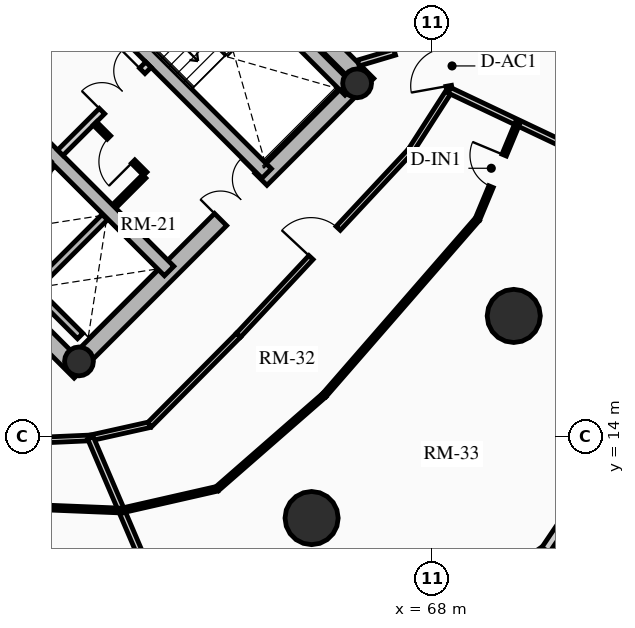
"""IFC4 building model, lengths in metres.
Left out: names, types, materials, properties, quantities, classifications, styles, units other than length and angle.
Written with IfcOpenShell. Run it as: python <this file> out.ifc"""

import sys

from ifc_helpers import new_model, si_unit, direction, frame, frame_2d, origin, origin_2d, place, context, subcontext, project, spatial, rectangle, circle, hollow_circle, extrude, source, transform, mapped, element, fill, save


model = new_model("IFC4")
c1 = context("Model", 3, precision=1e-05, world=origin(), true_north=direction((0.0, 1.0)))
c2 = subcontext(c1, "Body", "Model", "MODEL_VIEW")
j1 = project(units=[si_unit("LENGTHUNIT", "METRE"), si_unit("PLANEANGLEUNIT", "RADIAN")], contexts=[c1])
p1 = place(None, origin())
s1 = spatial("IfcSite", under=j1, at=p1, CompositionType="ELEMENT")
p2 = place(p1, origin())
s2 = spatial("IfcBuilding", under=s1, at=p2, CompositionType="ELEMENT")
p3 = place(p2, frame((0.0, 0.0, 107.98)))
s3 = spatial("IfcBuildingStorey", under=s2, at=p3, CompositionType="ELEMENT", Elevation=107.98)
for number, where, z_axis, x_axis in (
    (1, (58.737, 15.697, 0.0), (0.0, 0.0, 1.0), (-0.707, 0.707, 0.0)),
    (2, (66.303, 23.263, 0.0), (0.0, 0.0, 1.0), (-0.707, 0.707, 0.0)),
):
    element("IfcWall", number, at=place(p3, frame(where, z_axis=z_axis, x_axis=x_axis)), inside=s3, PredefinedType="SHEAR", context=c2, shape_type="SweptSolid", body=[
        extrude(rectangle(XDim=14.2, YDim=0.45, at=frame_2d((7.1, 0.0))), origin(), (0.0, 0.0, 1.0), 2.91),
    ])
p4 = place(p3, frame((58.578, 15.856, 0.0), z_axis=(0.0, 0.0, 1.0), x_axis=(0.707106781187, 0.707106781187, 0.0)))
e3 = element("IfcWall", 3, at=p4, inside=s3, PredefinedType="SHEAR", context=c2, shape_type="SweptSolid", body=[
    extrude(rectangle(XDim=10.7, YDim=0.45, at=frame_2d((5.35, 0.0))), origin(), (0.0, 0.0, 1.0), 2.91),
])
m1 = source(origin(), c2, "Body", "SweptSolid", [
    extrude(rectangle(XDim=1.5, YDim=2.02, at=frame_2d((0.75, 1.01))), frame((0.0, 0.235, 0.0), z_axis=(0.0, -1.0, 0.0), x_axis=(1.0, 0.0, 0.0)), (0.0, 0.0, 1.0), 0.47),
])
p5 = place(p4, frame((5.45, 0.0, 0.0)))
e4 = element("IfcOpeningElement", 4, at=p5, cuts=e3, PredefinedType="OPENING", context=c2, shape_type="MappedRepresentation", body=[
    mapped(m1, transform((0.0, 0.0, 0.0), x_axis=(1.0, 0.0, 0.0), y_axis=(0.0, 1.0, 0.0), z_axis=(0.0, 0.0, 1.0), scale=1.0)),
])
p6 = place(p3, frame((61.078, 18.355, 0.0), z_axis=(0.0, 0.0, 1.0), x_axis=(-0.707106781187, 0.707106781187, 0.0)))
e5 = element("IfcWall", 5, at=p6, inside=s3, PredefinedType="SHEAR", context=c2, shape_type="SweptSolid", body=[
    extrude(rectangle(XDim=13.75, YDim=0.35, at=frame_2d((6.875, 0.0))), origin(), (0.0, 0.0, 1.0), 2.91),
])
m2 = source(origin(), c2, "Body", "SweptSolid", [
    extrude(rectangle(XDim=1.1, YDim=2.015, at=frame_2d((0.55, 1.007))), frame((0.0, 0.185, 0.0), z_axis=(0.0, -1.0, 0.0), x_axis=(1.0, 0.0, 0.0)), (0.0, 0.0, 1.0), 0.37),
])
p7 = place(p6, frame((4.875, 0.0, 0.0)))
e6 = element("IfcOpeningElement", 6, at=p7, cuts=e5, PredefinedType="OPENING", context=c2, shape_type="MappedRepresentation", body=[
    mapped(m2, transform((0.0, 0.0, 0.0), x_axis=(1.0, 0.0, 0.0), y_axis=(0.0, 1.0, 0.0), z_axis=(0.0, 0.0, 1.0), scale=1.0)),
])
m3 = source(origin(), c2, "Body", "SweptSolid", [
    extrude(rectangle(XDim=1.15, YDim=2.02, at=frame_2d((0.575, 1.01))), frame((0.0, 0.185, 0.0), z_axis=(0.0, -1.0, 0.0), x_axis=(1.0, 0.0, 0.0)), (0.0, 0.0, 1.0), 0.37),
])
p8 = place(p6, frame((7.295, 0.0, 0.0)))
e7 = element("IfcOpeningElement", 7, at=p8, cuts=e5, PredefinedType="OPENING", context=c2, shape_type="MappedRepresentation", body=[
    mapped(m3, transform((0.0, 0.0, 0.0), x_axis=(1.0, 0.0, 0.0), y_axis=(0.0, 1.0, 0.0), z_axis=(0.0, 0.0, 1.0), scale=1.0)),
])
p9 = place(p3, frame((63.645, 20.922, 0.0), z_axis=(0.0, 0.0, 1.0), x_axis=(-0.707106781187, 0.707106781187, 0.0)))
e8 = element("IfcWall", 8, at=p9, inside=s3, PredefinedType="SHEAR", context=c2, shape_type="SweptSolid", body=[
    extrude(rectangle(XDim=13.75, YDim=0.35, at=frame_2d((6.875, 0.0))), origin(), (0.0, 0.0, 1.0), 2.91),
])
p10 = place(p9, frame((10.0, 0.0, 0.0)))
e9 = element("IfcOpeningElement", 9, at=p10, cuts=e8, PredefinedType="OPENING", context=c2, shape_type="MappedRepresentation", body=[
    mapped(m2, transform((0.0, 0.0, 0.0), x_axis=(1.0, 0.0, 0.0), y_axis=(0.0, 1.0, 0.0), z_axis=(0.0, 0.0, 1.0), scale=1.0)),
])
p11 = place(p9, frame((12.0, 0.0, 0.0)))
e10 = element("IfcOpeningElement", 10, at=p11, cuts=e8, PredefinedType="OPENING", context=c2, shape_type="MappedRepresentation", body=[
    mapped(m2, transform((0.0, 0.0, 0.0), x_axis=(1.0, 0.0, 0.0), y_axis=(0.0, 1.0, 0.0), z_axis=(0.0, 0.0, 1.0), scale=1.0)),
])
p12 = place(p9, frame((5.305, 0.0, 0.0)))
e11 = element("IfcOpeningElement", 11, at=p12, cuts=e8, PredefinedType="OPENING", context=c2, shape_type="MappedRepresentation", body=[
    mapped(m3, transform((0.0, 0.0, 0.0), x_axis=(1.0, 0.0, 0.0), y_axis=(0.0, 1.0, 0.0), z_axis=(0.0, 0.0, 1.0), scale=1.0)),
])
p13 = place(p3, frame((65.83, 23.107, 0.0), z_axis=(0.0, 0.0, 1.0), x_axis=(-0.707088616009, 0.707124945897, 0.0)))
e12 = element("IfcWall", 12, at=p13, inside=s3, PredefinedType="SHEAR", context=c2, shape_type="SweptSolid", body=[
    extrude(rectangle(XDim=6.72, YDim=0.35, at=frame_2d((3.36, 0.0))), origin(), (0.0, 0.0, 1.0), 2.91),
])
for number, where, z_axis, x_axis in (
    (13, (58.706, 15.976, 0.0), (0.0, 0.0, 1.0), (0.707, 0.707, 0.0)),
    (14, (66.024, 23.294, 0.0), (0.0, 0.0, 1.0), (0.707, 0.707, 0.0)),
):
    element("IfcColumn", number, at=place(p3, frame(where, z_axis=z_axis, x_axis=x_axis)), inside=s3, PredefinedType="COLUMN", context=c2, shape_type="SweptSolid", body=[
        extrude(hollow_circle(Radius=0.38, WallThickness=0.032, at=origin_2d()), origin(), (0.0, 0.0, 1.0), 2.91),
    ])
for number, where, z_axis, x_axis in (
    (15, (64.827, 11.854, 0.0), (0.0, 0.0, 1.0), (1.0, 0.0, 0.0)),
    (16, (70.146, 17.173, 0.0), (0.0, 0.0, 1.0), (1.0, 0.0, 0.0)),
):
    element("IfcColumn", number, at=place(p3, frame(where, z_axis=z_axis, x_axis=x_axis)), inside=s3, PredefinedType="USERDEFINED", context=c2, shape_type="SweptSolid", body=[
        extrude(circle(Radius=0.7, at=origin_2d()), origin(), (0.0, 0.0, 1.0), 2.91),
    ])
p14 = place(p3, frame((70.985, 11.015, 0.0), z_axis=(0.0, 0.0, 1.0), x_axis=(-0.828781148131, -0.559572880421, 0.0)))
e17 = element("IfcWall", 17, at=p14, inside=s3, PredefinedType="SOLIDWALL", context=c2, shape_type="SweptSolid", body=[
    extrude(rectangle(XDim=4.905, YDim=0.24, at=frame_2d((2.452, 0.0))), origin(), (0.0, 0.0, 1.0), 2.179),
])
p15 = place(p3, frame((73.729, 15.08, 0.0), z_axis=(0.0, 0.0, 1.0), x_axis=(-0.559572880421, -0.828781148131, 0.0)))
e18 = element("IfcWall", 18, at=p15, inside=s3, PredefinedType="SOLIDWALL", context=c2, shape_type="SweptSolid", body=[
    extrude(rectangle(XDim=4.905, YDim=0.24, at=frame_2d((2.452, 0.0))), origin(), (0.0, 0.0, 1.0), 2.179),
])
m4 = source(origin(), c2, "Body", "SweptSolid", [
    extrude(rectangle(XDim=1.9, YDim=1.35, at=frame_2d((0.95, 0.675))), frame((0.0, 0.13, 0.0), z_axis=(0.0, -1.0, 0.0), x_axis=(1.0, 0.0, 0.0)), (0.0, 0.0, 1.0), 0.26),
])
p16 = place(p15, frame((1.502, 0.0, 0.65)))
e19 = element("IfcOpeningElement", 19, at=p16, cuts=e18, PredefinedType="OPENING", context=c2, shape_type="MappedRepresentation", body=[
    mapped(m4, transform((0.0, 0.0, 0.0), x_axis=(1.0, 0.0, 0.0), y_axis=(0.0, 1.0, 0.0), z_axis=(0.0, 0.0, 1.0), scale=1.0)),
])
p17 = place(p3, frame((55.888, 19.069, 0.0), z_axis=(0.0, 0.0, 1.0), x_axis=(0.707106781187, 0.707106781187, 0.0)))
e20 = element("IfcWall", 20, at=p17, inside=s3, PredefinedType="SHEAR", context=c2, shape_type="SweptSolid", body=[
    extrude(rectangle(XDim=2.97, YDim=0.2, at=frame_2d((1.485, 0.0))), origin(), (0.0, 0.0, 1.0), 2.91),
])
p18 = place(p3, frame((57.284, 17.673, 0.0), z_axis=(0.0, 0.0, 1.0), x_axis=(0.707147878904, 0.70706568108, 0.0)))
e21 = element("IfcWall", 21, at=p18, inside=s3, PredefinedType="SHEAR", context=c2, shape_type="SweptSolid", body=[
    extrude(rectangle(XDim=2.97, YDim=0.2, at=frame_2d((1.485, 0.0))), origin(), (0.0, 0.0, 1.0), 2.91),
])
p19 = place(p3, frame((58.737, 16.644, 0.0), z_axis=(0.0, 0.0, 1.0), x_axis=(-0.707032117043, 0.707181437447, 0.0)))
e22 = element("IfcWall", 22, at=p19, inside=s3, PredefinedType="SHEAR", context=c2, shape_type="SweptSolid", body=[
    extrude(rectangle(XDim=1.635, YDim=0.2, at=frame_2d((0.817, 0.0))), origin(), (0.0, 0.0, 1.0), 2.91),
])
p20 = place(p3, frame((58.214, 21.467, 0.0), z_axis=(0.0, 0.0, 1.0), x_axis=(0.707106781187, 0.707106781187, 0.0)))
e23 = element("IfcWall", 23, at=p20, inside=s3, PredefinedType="PARTITIONING", context=c2, shape_type="SweptSolid", body=[
    extrude(rectangle(XDim=3.28, YDim=0.2, at=frame_2d((1.64, 0.0))), origin(), (0.0, 0.0, 1.0), 2.655),
])
m5 = source(origin(), c2, "Body", "SweptSolid", [
    extrude(rectangle(XDim=1.5, YDim=2.02, at=frame_2d((0.75, 1.01))), frame((0.0, 0.11, 0.0), z_axis=(0.0, -1.0, 0.0), x_axis=(1.0, 0.0, 0.0)), (0.0, 0.0, 1.0), 0.22),
])
p21 = place(p20, frame((1.55, 0.0, 0.0)))
e24 = element("IfcOpeningElement", 24, at=p21, cuts=e23, PredefinedType="OPENING", context=c2, shape_type="MappedRepresentation", body=[
    mapped(m5, transform((0.0, 0.0, 0.0), x_axis=(1.0, 0.0, 0.0), y_axis=(0.0, 1.0, 0.0), z_axis=(0.0, 0.0, 1.0), scale=1.0)),
])
p22 = place(p3, frame((60.448, 20.915, 0.0), z_axis=(0.0, 0.0, 1.0), x_axis=(-0.707106781187, 0.707106781187, 0.0)))
e25 = element("IfcWall", 25, at=p22, inside=s3, PredefinedType="PARTITIONING", context=c2, shape_type="SweptSolid", body=[
    extrude(rectangle(XDim=1.87, YDim=0.125, at=frame_2d((0.935, 0.0))), origin(), (0.0, 0.0, 1.0), 2.655),
])
m6 = source(origin(), c2, "Body", "SweptSolid", [
    extrude(rectangle(XDim=0.9, YDim=2.005, at=frame_2d((0.45, 1.002))), frame((0.0, 0.073, 0.0), z_axis=(0.0, -1.0, 0.0), x_axis=(1.0, 0.0, 0.0)), (0.0, 0.0, 1.0), 0.145),
])
p23 = place(p22, frame((0.45, 0.0, 0.0)))
e26 = element("IfcOpeningElement", 26, at=p23, cuts=e25, PredefinedType="OPENING", context=c2, shape_type="MappedRepresentation", body=[
    mapped(m6, transform((0.0, 0.0, 0.0), x_axis=(1.0, 0.0, 0.0), y_axis=(0.0, 1.0, 0.0), z_axis=(0.0, 0.0, 1.0), scale=1.0)),
])
p24 = place(p3, frame((59.643, 20.066, 0.0), z_axis=(0.0, 0.0, 1.0), x_axis=(0.707106781187, 0.707106781187, 0.0)))
e27 = element("IfcWall", 27, at=p24, inside=s3, PredefinedType="PARTITIONING", context=c2, shape_type="SweptSolid", body=[
    extrude(rectangle(XDim=1.1, YDim=0.125, at=frame_2d((0.55, 0.0))), origin(), (0.0, 0.0, 1.0), 2.655),
])
p25 = place(p3, frame((57.511, 13.897, 0.0), z_axis=(0.0, 0.0, 1.0), x_axis=(0.999024538494, 0.044158481476, 0.0)))
e28 = element("IfcWall", 28, at=p25, inside=s3, PredefinedType="PARTITIONING", context=c2, shape_type="SweptSolid", body=[
    extrude(rectangle(XDim=1.498, YDim=0.15, at=frame_2d((0.749, 0.0))), origin(), (0.0, 0.0, 1.0), 2.225),
])
p26 = place(p3, frame((59.008, 13.963, 0.0), z_axis=(0.0, 0.0, 1.0), x_axis=(0.976020856791, 0.21767702476, 0.0)))
e29 = element("IfcWall", 29, at=p26, inside=s3, PredefinedType="PARTITIONING", context=c2, shape_type="SweptSolid", body=[
    extrude(rectangle(XDim=1.593, YDim=0.15, at=frame_2d((0.796, 0.0))), origin(), (0.0, 0.0, 1.0), 2.225),
])
p27 = place(p3, frame((60.562, 14.31, 0.0), z_axis=(0.0, 0.0, 1.0), x_axis=(0.704566236161, 0.709638230975, 0.0)))
e30 = element("IfcWall", 30, at=p27, inside=s3, PredefinedType="PARTITIONING", context=c2, shape_type="SweptSolid", body=[
    extrude(rectangle(XDim=3.321, YDim=0.15, at=frame_2d((1.661, 0.0))), origin(), (0.0, 0.0, 1.0), 2.225),
])
p28 = place(p3, frame((62.903, 16.667, 0.0), z_axis=(0.0, 0.0, 1.0), x_axis=(0.682371947497, 0.731005147225, 0.0)))
e31 = element("IfcWall", 31, at=p28, inside=s3, PredefinedType="PARTITIONING", context=c2, shape_type="SweptSolid", body=[
    extrude(rectangle(XDim=6.642, YDim=0.15, at=frame_2d((3.321, 0.0))), origin(), (0.0, 0.0, 1.0), 2.225),
])
m7 = source(origin(), c2, "Body", "SweptSolid", [
    extrude(rectangle(XDim=1.05, YDim=2.015, at=frame_2d((0.525, 1.007))), frame((0.0, 0.085, 0.0), z_axis=(0.0, -1.0, 0.0), x_axis=(1.0, 0.0, 0.0)), (0.0, 0.0, 1.0), 0.17),
])
p29 = place(p28, frame((2.796, 0.0, 0.0)))
e32 = element("IfcOpeningElement", 32, at=p29, cuts=e31, PredefinedType="OPENING", context=c2, shape_type="MappedRepresentation", body=[
    mapped(m7, transform((0.0, 0.0, 0.0), x_axis=(1.0, 0.0, 0.0), y_axis=(0.0, 1.0, 0.0), z_axis=(0.0, 0.0, 1.0), scale=1.0)),
])
p30 = place(p3, frame((67.435, 21.521, 0.0), z_axis=(0.0, 0.0, 1.0), x_axis=(0.540777197838, 0.841165870859, 0.0)))
e33 = element("IfcWall", 33, at=p30, inside=s3, PredefinedType="PARTITIONING", context=c2, shape_type="SweptSolid", body=[
    extrude(rectangle(XDim=1.888, YDim=0.15, at=frame_2d((0.944, 0.0))), origin(), (0.0, 0.0, 1.0), 2.225),
])
p31 = place(p3, frame((68.456, 23.11, 0.0), z_axis=(0.0, 0.0, 1.0), x_axis=(-0.1772522795, 0.984165448191, 0.0)))
e34 = element("IfcWall", 34, at=p31, inside=s3, PredefinedType="PARTITIONING", context=c2, shape_type="SweptSolid", body=[
    extrude(rectangle(XDim=1.382, YDim=0.15, at=frame_2d((0.691, 0.0))), origin(), (0.0, 0.0, 1.0), 2.225),
])
m8 = source(origin(), c2, "Body", "SweptSolid", [
    extrude(rectangle(XDim=1.0, YDim=2.015, at=frame_2d((0.5, 1.007))), frame((0.0, 0.085, 0.0), z_axis=(0.0, -1.0, 0.0), x_axis=(1.0, 0.0, 0.0)), (0.0, 0.0, 1.0), 0.17),
])
p32 = place(p31, frame((0.12, 0.0, 0.0)))
e35 = element("IfcOpeningElement", 35, at=p32, cuts=e34, PredefinedType="OPENING", context=c2, shape_type="MappedRepresentation", body=[
    mapped(m8, transform((0.0, 0.0, 0.0), x_axis=(1.0, 0.0, 0.0), y_axis=(0.0, 1.0, 0.0), z_axis=(0.0, 0.0, 1.0), scale=1.0)),
])
p33 = place(p3, frame((59.008, 13.963, 0.0), z_axis=(0.0, 0.0, 1.0), x_axis=(0.393439207333, -0.919350635032, 0.0)))
e36 = element("IfcWall", 36, at=p33, inside=s3, PredefinedType="PARTITIONING", context=c2, shape_type="SweptSolid", body=[
    extrude(rectangle(XDim=7.427, YDim=0.16, at=frame_2d((3.713, 0.0))), origin(), (0.0, 0.0, 1.0), 2.179),
])
p34 = place(p3, frame((68.456, 23.11, 0.0), z_axis=(0.0, 0.0, 1.0), x_axis=(0.903539425667, -0.428504966442, 0.0)))
e37 = element("IfcWall", 37, at=p34, inside=s3, PredefinedType="PARTITIONING", context=c2, shape_type="SweptSolid", body=[
    extrude(rectangle(XDim=7.094, YDim=0.16, at=frame_2d((3.547, 0.0))), origin(), (0.0, 0.0, 1.0), 2.179),
])
p35 = place(p3, frame((66.056, 23.828, 0.0), z_axis=(0.0, 0.0, 1.0), x_axis=(0.958475403544, 0.285175210708, 0.0)))
e38 = element("IfcWall", 38, at=p35, inside=s3, PredefinedType="PARTITIONING", context=c2, shape_type="SweptSolid", body=[
    extrude(rectangle(XDim=2.248, YDim=0.16, at=frame_2d((1.124, 0.0))), origin(), (0.0, 0.0, 1.0), 2.225),
])
m9 = source(origin(), c2, "Body", "SweptSolid", [
    extrude(rectangle(XDim=1.05, YDim=2.015, at=frame_2d((0.525, 1.007))), frame((0.0, 0.09, 0.0), z_axis=(0.0, -1.0, 0.0), x_axis=(1.0, 0.0, 0.0)), (0.0, 0.0, 1.0), 0.18),
])
p36 = place(p35, frame((0.998, 0.0, 0.0)))
e39 = element("IfcOpeningElement", 39, at=p36, cuts=e38, PredefinedType="OPENING", context=c2, shape_type="MappedRepresentation", body=[
    mapped(m9, transform((0.0, 0.0, 0.0), x_axis=(1.0, 0.0, 0.0), y_axis=(0.0, 1.0, 0.0), z_axis=(0.0, 0.0, 1.0), scale=1.0)),
])
p37 = place(p3, frame((57.233, 12.156, 0.0), z_axis=(0.0, 0.0, 1.0), x_axis=(0.999181916557, -0.040441286156, 0.0)))
e40 = element("IfcWall", 40, at=p37, inside=s3, PredefinedType="PARTITIONING", context=c2, shape_type="SweptSolid", body=[
    extrude(rectangle(XDim=2.596, YDim=0.125, at=frame_2d((1.298, 0.0))), origin(), (0.0, 0.0, 1.0), 2.655),
])
p38 = place(p3, frame((59.826, 12.051, 0.0), z_axis=(0.0, 0.0, 1.0), x_axis=(0.975009915085, 0.222161350116, 0.0)))
e41 = element("IfcWall", 41, at=p38, inside=s3, PredefinedType="PARTITIONING", context=c2, shape_type="SweptSolid", body=[
    extrude(rectangle(XDim=2.578, YDim=0.125, at=frame_2d((1.289, 0.0))), origin(), (0.0, 0.0, 1.0), 2.225),
])
p39 = place(p3, frame((62.34, 12.624, 0.0), z_axis=(0.0, 0.0, 1.0), x_axis=(0.753169839919, 0.657826110941, 0.0)))
e42 = element("IfcWall", 42, at=p39, inside=s3, PredefinedType="PARTITIONING", context=c2, shape_type="SweptSolid", body=[
    extrude(rectangle(XDim=3.746, YDim=0.125, at=frame_2d((1.873, 0.0))), origin(), (0.0, 0.0, 1.0), 2.225),
])
p40 = place(p3, frame((65.162, 15.088, 0.0), z_axis=(0.0, 0.0, 1.0), x_axis=(0.656379509785, 0.754430871011, 0.0)))
e43 = element("IfcWall", 43, at=p40, inside=s3, PredefinedType="PARTITIONING", context=c2, shape_type="SweptSolid", body=[
    extrude(rectangle(XDim=6.14, YDim=0.125, at=frame_2d((3.07, 0.0))), origin(), (0.0, 0.0, 1.0), 2.225),
])
p41 = place(p3, frame((69.192, 19.72, 0.0), z_axis=(0.0, 0.0, 1.0), x_axis=(0.384899070029, 0.922958669655, 0.0)))
e44 = element("IfcWall", 44, at=p41, inside=s3, PredefinedType="PARTITIONING", context=c2, shape_type="SweptSolid", body=[
    extrude(rectangle(XDim=2.75, YDim=0.125, at=frame_2d((1.375, 0.0))), origin(), (0.0, 0.0, 1.0), 2.179),
])
p42 = place(p41, frame((0.925, 0.0, 0.0)))
e45 = element("IfcOpeningElement", 45, at=p42, cuts=e44, PredefinedType="OPENING", context=c2, shape_type="MappedRepresentation", body=[
    mapped(m6, transform((0.0, 0.0, 0.0), x_axis=(1.0, 0.0, 0.0), y_axis=(0.0, 1.0, 0.0), z_axis=(0.0, 0.0, 1.0), scale=1.0)),
])
m10 = source(origin(), c2, "Body", "SweptSolid", [
    extrude(rectangle(XDim=1.5, YDim=2.02, at=frame_2d((0.75, 1.01))), frame((0.0, 0.025, 0.0), z_axis=(0.0, -1.0, 0.0), x_axis=(1.0, 0.0, 0.0)), (0.0, 0.0, 1.0), 0.05),
])
p43 = place(p5, origin())
e46 = element("IfcDoor", 46, at=p43, inside=s3, OperationType="DOUBLE_DOOR_SINGLE_SWING", PredefinedType="DOOR", context=c2, shape_type="MappedRepresentation", body=[
    mapped(m10, transform((0.0, 0.0, 0.0), x_axis=(1.0, 0.0, 0.0), y_axis=(0.0, 1.0, 0.0), z_axis=(0.0, 0.0, 1.0), scale=1.0)),
])
fill(e4, e46)
p44 = place(p21, origin())
e47 = element("IfcDoor", 47, at=p44, inside=s3, OperationType="DOUBLE_DOOR_SINGLE_SWING", PredefinedType="DOOR", context=c2, shape_type="MappedRepresentation", body=[
    mapped(m10, transform((0.0, 0.0, 0.0), x_axis=(1.0, 0.0, 0.0), y_axis=(0.0, 1.0, 0.0), z_axis=(0.0, 0.0, 1.0), scale=1.0)),
])
fill(e24, e47)
m11 = source(origin(), c2, "Body", "SweptSolid", [
    extrude(rectangle(XDim=0.9, YDim=2.005, at=frame_2d((0.45, 1.002))), frame((0.0, 0.025, 0.0), z_axis=(0.0, -1.0, 0.0), x_axis=(1.0, 0.0, 0.0)), (0.0, 0.0, 1.0), 0.05),
])
p45 = place(p23, origin())
e48 = element("IfcDoor", 48, at=p45, inside=s3, OperationType="SINGLE_SWING_LEFT", PredefinedType="DOOR", context=c2, shape_type="MappedRepresentation", body=[
    mapped(m11, transform((0.0, 0.0, 0.0), x_axis=(1.0, 0.0, 0.0), y_axis=(0.0, 1.0, 0.0), z_axis=(0.0, 0.0, 1.0), scale=1.0)),
])
fill(e26, e48)
m12 = source(origin(), c2, "Body", "SweptSolid", [
    extrude(rectangle(XDim=1.05, YDim=2.015, at=frame_2d((0.525, 1.007))), frame((0.0, 0.025, 0.0), z_axis=(0.0, -1.0, 0.0), x_axis=(1.0, 0.0, 0.0)), (0.0, 0.0, 1.0), 0.05),
])
p46 = place(p36, origin())
e49 = element("IfcDoor", 49, at=p46, inside=s3, OperationType="SINGLE_SWING_LEFT", PredefinedType="DOOR", context=c2, shape_type="MappedRepresentation", body=[
    mapped(m12, transform((0.0, 0.0, 0.0), x_axis=(1.0, 0.0, 0.0), y_axis=(0.0, 1.0, 0.0), z_axis=(0.0, 0.0, 1.0), scale=1.0)),
])
fill(e39, e49)
p47 = place(p29, origin())
e50 = element("IfcDoor", 50, at=p47, inside=s3, OperationType="SINGLE_SWING_LEFT", PredefinedType="DOOR", context=c2, shape_type="MappedRepresentation", body=[
    mapped(m12, transform((0.0, 0.0, 0.0), x_axis=(1.0, 0.0, 0.0), y_axis=(0.0, 1.0, 0.0), z_axis=(0.0, 0.0, 1.0), scale=1.0)),
])
fill(e32, e50)
p48 = place(p42, origin())
e51 = element("IfcDoor", 51, at=p48, inside=s3, OperationType="SINGLE_SWING_RIGHT", PredefinedType="DOOR", context=c2, shape_type="MappedRepresentation", body=[
    mapped(m11, transform((0.0, 0.0, 0.0), x_axis=(1.0, 0.0, 0.0), y_axis=(0.0, 1.0, 0.0), z_axis=(0.0, 0.0, 1.0), scale=1.0)),
])
fill(e45, e51)
m13 = source(origin(), c2, "Body", "SweptSolid", [
    extrude(rectangle(XDim=1.0, YDim=2.015, at=frame_2d((0.5, 1.007))), frame((0.0, 0.025, 0.0), z_axis=(0.0, -1.0, 0.0), x_axis=(1.0, 0.0, 0.0)), (0.0, 0.0, 1.0), 0.05),
])
p49 = place(p32, origin())
e52 = element("IfcDoor", 52, at=p49, inside=s3, OperationType="SINGLE_SWING_LEFT", PredefinedType="DOOR", context=c2, shape_type="MappedRepresentation", body=[
    mapped(m13, transform((0.0, 0.0, 0.0), x_axis=(1.0, 0.0, 0.0), y_axis=(0.0, 1.0, 0.0), z_axis=(0.0, 0.0, 1.0), scale=1.0)),
])
fill(e35, e52)
save(model, sys.argv[1])
